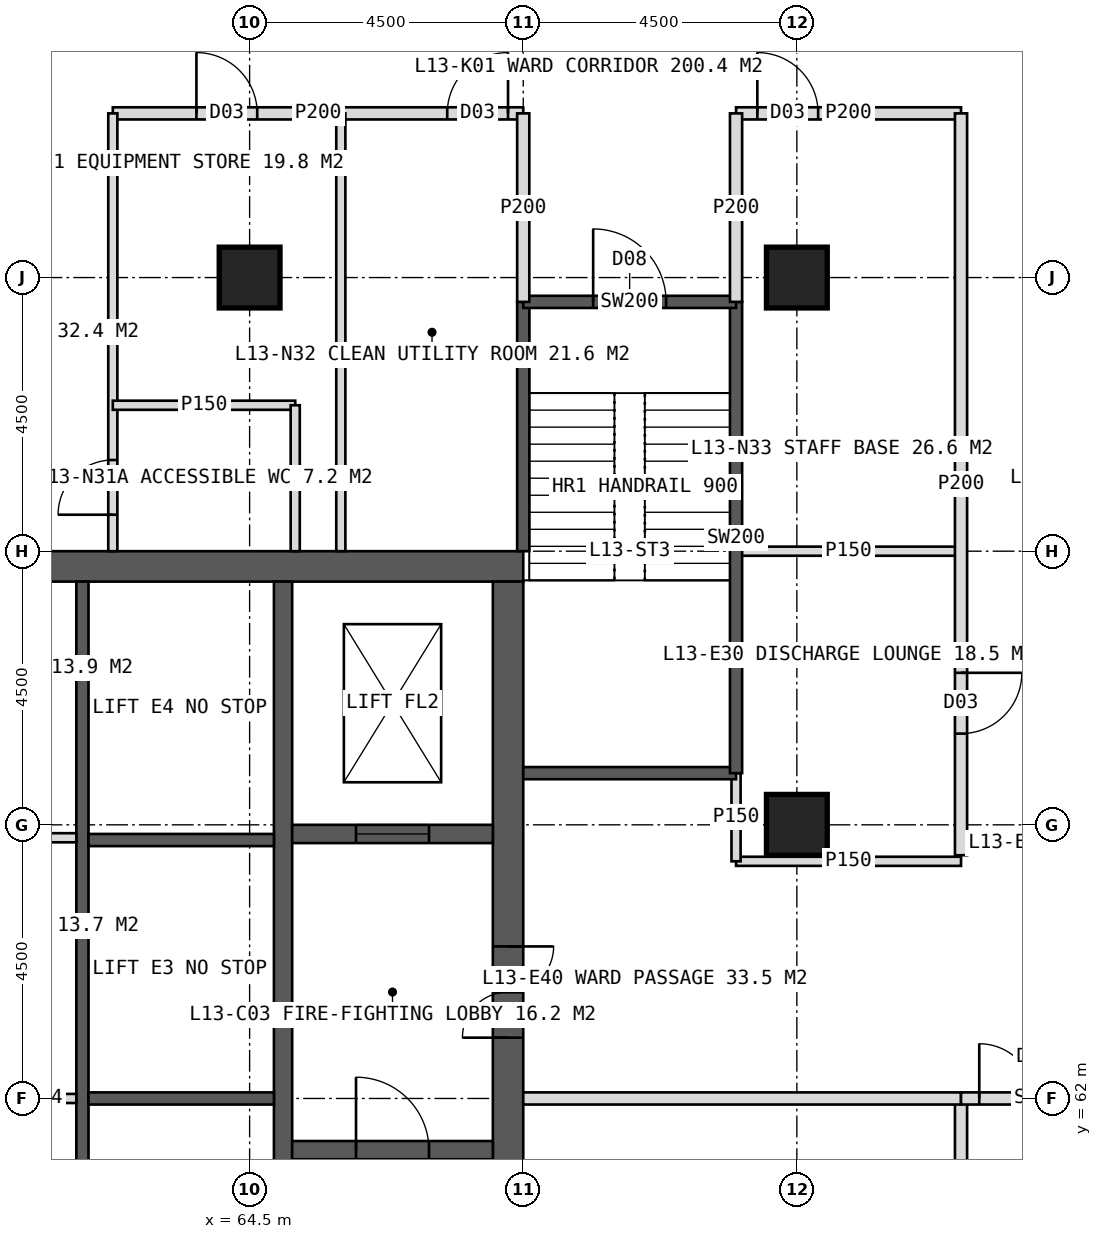
"""IFC4 building model, lengths in metres.
Left out: names, types, materials, properties, quantities, classifications, styles, units other than length and angle.
Written with IfcOpenShell. Run it as: python <this file> out.ifc"""

import sys

from ifc_helpers import new_model, si_unit, direction, frame, frame_2d, origin, origin_2d, place, context, subcontext, project, spatial, rectangle, hollow_rectangle, extrude, element, fill, save


model = new_model("IFC4")
c1 = context("Model", 3, precision=1e-05, world=origin(), true_north=direction((0.0, 1.0)))
c2 = subcontext(c1, "Body", "Model", "MODEL_VIEW")
j1 = project(units=[si_unit("LENGTHUNIT", "METRE"), si_unit("PLANEANGLEUNIT", "RADIAN")], contexts=[c1])
p1 = place(None, origin())
s1 = spatial("IfcSite", under=j1, at=p1, CompositionType="ELEMENT")
p2 = place(p1, origin())
s2 = spatial("IfcBuilding", under=s1, at=p2, CompositionType="ELEMENT")
p3 = place(p2, frame((0.0, 0.0, 59.0)))
s3 = spatial("IfcBuildingStorey", under=s2, at=p3, CompositionType="ELEMENT", Elevation=59.0)
p4 = place(p3, frame((51.0, 70.75, 0.0), z_axis=(0.0, 0.0, 1.0), x_axis=(1.0, 0.0, 0.0)))
e1 = element("IfcWall", 1, at=p4, inside=s3, PredefinedType="SHEAR", context=c2, shape_type="SweptSolid", body=[
    extrude(rectangle(XDim=18.0, YDim=0.5, at=frame_2d((9.0, 0.0))), origin(), (0.0, 0.0, 1.0), 4.0),
])
p5 = place(p4, frame((8.1, 0.0, 0.0)))
e2 = element("IfcOpeningElement", 2, at=p5, cuts=e1, PredefinedType="OPENING", context=c2, shape_type="SweptSolid", body=[
    extrude(rectangle(XDim=1.8, YDim=2.2, at=frame_2d((0.9, 1.1))), frame((0.0, 0.26, 0.0), z_axis=(0.0, -1.0, 0.0), x_axis=(1.0, 0.0, 0.0)), (0.0, 0.0, 1.0), 0.52),
])
p6 = place(p3, frame((68.75, 53.5, 0.0), z_axis=(0.0, 0.0, 1.0), x_axis=(0.0, 1.0, 0.0)))
e3 = element("IfcWall", 3, at=p6, inside=s3, PredefinedType="SHEAR", context=c2, shape_type="SweptSolid", body=[
    extrude(rectangle(XDim=17.0, YDim=0.5, at=frame_2d((8.5, 0.0))), origin(), (0.0, 0.0, 1.0), 4.0),
])
p7 = place(p6, frame((9.5, 0.0, 0.0)))
e4 = element("IfcOpeningElement", 4, at=p7, cuts=e3, PredefinedType="OPENING", context=c2, shape_type="SweptSolid", body=[
    extrude(rectangle(XDim=1.5, YDim=2.2, at=frame_2d((0.75, 1.1))), frame((0.0, 0.26, 0.0), z_axis=(0.0, -1.0, 0.0), x_axis=(1.0, 0.0, 0.0)), (0.0, 0.0, 1.0), 0.52),
])
p8 = place(p3, frame((65.05, 53.5, 0.0), z_axis=(0.0, 0.0, 1.0), x_axis=(0.0, 1.0, 0.0)))
e5 = element("IfcWall", 5, at=p8, inside=s3, PredefinedType="SHEAR", context=c2, shape_type="SweptSolid", body=[
    extrude(rectangle(XDim=17.0, YDim=0.3, at=frame_2d((8.5, 0.0))), origin(), (0.0, 0.0, 1.0), 4.0),
])
p9 = place(p3, frame((61.75, 53.5, 0.0), z_axis=(0.0, 0.0, 1.0), x_axis=(0.0, 1.0, 0.0)))
e6 = element("IfcWall", 6, at=p9, inside=s3, PredefinedType="SHEAR", context=c2, shape_type="SweptSolid", body=[
    extrude(rectangle(XDim=17.0, YDim=0.2, at=frame_2d((8.5, 0.0))), origin(), (0.0, 0.0, 1.0), 4.0),
])
p10 = place(p9, frame((1.375, 0.0, 0.0)))
e7 = element("IfcOpeningElement", 7, at=p10, cuts=e6, PredefinedType="OPENING", context=c2, shape_type="SweptSolid", body=[
    extrude(rectangle(XDim=1.4, YDim=2.2, at=frame_2d((0.7, 1.1))), frame((0.0, 0.11, 0.0), z_axis=(0.0, -1.0, 0.0), x_axis=(1.0, 0.0, 0.0)), (0.0, 0.0, 1.0), 0.22),
])
p11 = place(p9, frame((5.675, 0.0, 0.0)))
e8 = element("IfcOpeningElement", 8, at=p11, cuts=e6, PredefinedType="OPENING", context=c2, shape_type="SweptSolid", body=[
    extrude(rectangle(XDim=1.4, YDim=2.2, at=frame_2d((0.7, 1.1))), frame((0.0, 0.11, 0.0), z_axis=(0.0, -1.0, 0.0), x_axis=(1.0, 0.0, 0.0)), (0.0, 0.0, 1.0), 0.22),
])
for number, where, z_axis, x_axis in (
    (9, (61.85, 62.0, 0.0), (0.0, 0.0, 1.0), (1.0, 0.0, 0.0)),
    (10, (61.85, 66.25, 0.0), (0.0, 0.0, 1.0), (1.0, 0.0, 0.0)),
):
    element("IfcWall", number, at=place(p3, frame(where, z_axis=z_axis, x_axis=x_axis)), inside=s3, PredefinedType="SHEAR", context=c2, shape_type="SweptSolid", body=[
        extrude(rectangle(XDim=3.05, YDim=0.2, at=frame_2d((1.525, 0.0))), origin(), (0.0, 0.0, 1.0), 4.0),
    ])
p12 = place(p3, frame((65.2, 61.15, 0.0), z_axis=(0.0, 0.0, 1.0), x_axis=(1.0, 0.0, 0.0)))
e11 = element("IfcWall", 11, at=p12, inside=s3, PredefinedType="SHEAR", context=c2, shape_type="SweptSolid", body=[
    extrude(rectangle(XDim=3.3, YDim=0.3, at=frame_2d((1.65, 0.0))), origin(), (0.0, 0.0, 1.0), 4.0),
])
p13 = place(p12, frame((1.05, 0.0, 0.0)))
e12 = element("IfcOpeningElement", 12, at=p13, cuts=e11, PredefinedType="OPENING", context=c2, shape_type="SweptSolid", body=[
    extrude(rectangle(XDim=1.2, YDim=2.1, at=frame_2d((0.6, 1.05))), frame((0.0, 0.16, 0.0), z_axis=(0.0, -1.0, 0.0), x_axis=(1.0, 0.0, 0.0)), (0.0, 0.0, 1.0), 0.32),
])
p14 = place(p3, frame((65.2, 66.35, 0.0), z_axis=(0.0, 0.0, 1.0), x_axis=(1.0, 0.0, 0.0)))
e13 = element("IfcWall", 13, at=p14, inside=s3, PredefinedType="SHEAR", context=c2, shape_type="SweptSolid", body=[
    extrude(rectangle(XDim=3.3, YDim=0.3, at=frame_2d((1.65, 0.0))), origin(), (0.0, 0.0, 1.0), 4.0),
])
p15 = place(p14, frame((1.05, 0.0, 0.0)))
e14 = element("IfcOpeningElement", 14, at=p15, cuts=e13, PredefinedType="OPENING", context=c2, shape_type="SweptSolid", body=[
    extrude(rectangle(XDim=1.2, YDim=2.2, at=frame_2d((0.6, 1.1))), frame((0.0, 0.16, 0.0), z_axis=(0.0, -1.0, 0.0), x_axis=(1.0, 0.0, 0.0)), (0.0, 0.0, 1.0), 0.32),
])
for number, where, z_axis, x_axis in (
    (15, (73.5, 75.5, 0.0), (0.0, 0.0, 1.0), (1.0, 0.0, 0.0)),
    (16, (64.5, 75.5, 0.0), (0.0, 0.0, 1.0), (1.0, 0.0, 0.0)),
    (17, (73.5, 66.5, 0.0), (0.0, 0.0, 1.0), (1.0, 0.0, 0.0)),
):
    element("IfcColumn", number, at=place(p3, frame(where, z_axis=z_axis, x_axis=x_axis)), inside=s3, PredefinedType="COLUMN", context=c2, shape_type="SweptSolid", body=[
        extrude(hollow_rectangle(XDim=1.0, YDim=1.0, WallThickness=0.1, at=origin_2d()), origin(), (0.0, 0.0, 1.0), 4.0),
    ])
p16 = place(p3, frame((62.25, 78.2, 0.0), z_axis=(0.0, 0.0, 1.0), x_axis=(1.0, 0.0, 0.0)))
e18 = element("IfcWall", 18, at=p16, inside=s3, PredefinedType="PARTITIONING", context=c2, shape_type="SweptSolid", body=[
    extrude(rectangle(XDim=6.75, YDim=0.2, at=frame_2d((3.375, 0.0))), origin(), (0.0, 0.0, 1.0), 3.75),
])
p17 = place(p16, frame((1.375, 0.0, 0.0)))
e19 = element("IfcOpeningElement", 19, at=p17, cuts=e18, PredefinedType="OPENING", context=c2, shape_type="SweptSolid", body=[
    extrude(rectangle(XDim=1.0, YDim=2.1, at=frame_2d((0.5, 1.05))), frame((0.0, 0.11, 0.0), z_axis=(0.0, -1.0, 0.0), x_axis=(1.0, 0.0, 0.0)), (0.0, 0.0, 1.0), 0.22),
])
p18 = place(p16, frame((5.5, 0.0, 0.0)))
e20 = element("IfcOpeningElement", 20, at=p18, cuts=e18, PredefinedType="OPENING", context=c2, shape_type="SweptSolid", body=[
    extrude(rectangle(XDim=1.0, YDim=2.1, at=frame_2d((0.5, 1.05))), frame((0.0, 0.11, 0.0), z_axis=(0.0, -1.0, 0.0), x_axis=(1.0, 0.0, 0.0)), (0.0, 0.0, 1.0), 0.22),
])
p19 = place(p3, frame((72.5, 78.2, 0.0), z_axis=(0.0, 0.0, 1.0), x_axis=(1.0, 0.0, 0.0)))
e21 = element("IfcWall", 21, at=p19, inside=s3, PredefinedType="PARTITIONING", context=c2, shape_type="SweptSolid", body=[
    extrude(rectangle(XDim=3.7, YDim=0.2, at=frame_2d((1.85, 0.0))), origin(), (0.0, 0.0, 1.0), 3.75),
])
p20 = place(p19, frame((0.35, 0.0, 0.0)))
e22 = element("IfcOpeningElement", 22, at=p20, cuts=e21, PredefinedType="OPENING", context=c2, shape_type="SweptSolid", body=[
    extrude(rectangle(XDim=1.0, YDim=2.1, at=frame_2d((0.5, 1.05))), frame((0.0, 0.11, 0.0), z_axis=(0.0, -1.0, 0.0), x_axis=(1.0, 0.0, 0.0)), (0.0, 0.0, 1.0), 0.22),
])
p21 = place(p3, frame((62.25, 71.0, 0.0), z_axis=(0.0, 0.0, 1.0), x_axis=(0.0, 1.0, 0.0)))
e23 = element("IfcWall", 23, at=p21, inside=s3, PredefinedType="PARTITIONING", context=c2, shape_type="SweptSolid", body=[
    extrude(rectangle(XDim=7.2, YDim=0.15, at=frame_2d((3.6, 0.0))), origin(), (0.0, 0.0, 1.0), 3.75),
])
p22 = place(p21, frame((0.6, 0.0, 0.0)))
e24 = element("IfcOpeningElement", 24, at=p22, cuts=e23, PredefinedType="OPENING", context=c2, shape_type="SweptSolid", body=[
    extrude(rectangle(XDim=0.9, YDim=2.1, at=frame_2d((0.45, 1.05))), frame((0.0, 0.085, 0.0), z_axis=(0.0, -1.0, 0.0), x_axis=(1.0, 0.0, 0.0)), (0.0, 0.0, 1.0), 0.17),
])
p23 = place(p3, frame((66.0, 71.0, 0.0), z_axis=(0.0, 0.0, 1.0), x_axis=(0.0, 1.0, 0.0)))
e25 = element("IfcWall", 25, at=p23, inside=s3, PredefinedType="PARTITIONING", context=c2, shape_type="SweptSolid", body=[
    extrude(rectangle(XDim=7.2, YDim=0.15, at=frame_2d((3.6, 0.0))), origin(), (0.0, 0.0, 1.0), 3.75),
])
p24 = place(p3, frame((62.25, 73.4, 0.0), z_axis=(0.0, 0.0, 1.0), x_axis=(1.0, 0.0, 0.0)))
e26 = element("IfcWall", 26, at=p24, inside=s3, PredefinedType="PARTITIONING", context=c2, shape_type="SweptSolid", body=[
    extrude(rectangle(XDim=3.0, YDim=0.15, at=frame_2d((1.5, 0.0))), origin(), (0.0, 0.0, 1.0), 3.75),
])
p25 = place(p3, frame((65.25, 71.0, 0.0), z_axis=(0.0, 0.0, 1.0), x_axis=(0.0, 1.0, 0.0)))
e27 = element("IfcWall", 27, at=p25, inside=s3, PredefinedType="PARTITIONING", context=c2, shape_type="SweptSolid", body=[
    extrude(rectangle(XDim=2.4, YDim=0.15, at=frame_2d((1.2, 0.0))), origin(), (0.0, 0.0, 1.0), 3.75),
])
p26 = place(p3, frame((72.5, 71.0, 0.0), z_axis=(0.0, 0.0, 1.0), x_axis=(1.0, 0.0, 0.0)))
e28 = element("IfcWall", 28, at=p26, inside=s3, PredefinedType="PARTITIONING", context=c2, shape_type="SweptSolid", body=[
    extrude(rectangle(XDim=3.7, YDim=0.15, at=frame_2d((1.85, 0.0))), origin(), (0.0, 0.0, 1.0), 3.75),
])
p27 = place(p3, frame((76.2, 78.2, 0.0), z_axis=(0.0, 0.0, 1.0), x_axis=(0.0, -1.0, 0.0)))
e29 = element("IfcWall", 29, at=p27, inside=s3, PredefinedType="PARTITIONING", context=c2, shape_type="SweptSolid", body=[
    extrude(rectangle(XDim=12.2, YDim=0.2, at=frame_2d((6.1, 0.0))), origin(), (0.0, 0.0, 1.0), 3.75),
])
p28 = place(p27, frame((9.2, 0.0, 0.0)))
e30 = element("IfcOpeningElement", 30, at=p28, cuts=e29, PredefinedType="OPENING", context=c2, shape_type="SweptSolid", body=[
    extrude(rectangle(XDim=1.0, YDim=2.1, at=frame_2d((0.5, 1.05))), frame((0.0, 0.11, 0.0), z_axis=(0.0, -1.0, 0.0), x_axis=(1.0, 0.0, 0.0)), (0.0, 0.0, 1.0), 0.22),
])
p29 = place(p3, frame((76.2, 62.0, 0.0), z_axis=(0.0, 0.0, 1.0), x_axis=(0.0, -1.0, 0.0)))
e31 = element("IfcWall", 31, at=p29, inside=s3, PredefinedType="PARTITIONING", context=c2, shape_type="SweptSolid", body=[
    extrude(rectangle(XDim=16.2, YDim=0.2, at=frame_2d((8.1, 0.0))), origin(), (0.0, 0.0, 1.0), 3.75),
])
p30 = place(p29, frame((4.0, 0.0, 0.0)))
e32 = element("IfcOpeningElement", 32, at=p30, cuts=e31, PredefinedType="OPENING", context=c2, shape_type="SweptSolid", body=[
    extrude(rectangle(XDim=1.0, YDim=2.1, at=frame_2d((0.5, 1.05))), frame((0.0, 0.11, 0.0), z_axis=(0.0, -1.0, 0.0), x_axis=(1.0, 0.0, 0.0)), (0.0, 0.0, 1.0), 0.22),
])
p31 = place(p29, frame((12.1, 0.0, 0.0)))
e33 = element("IfcOpeningElement", 33, at=p31, cuts=e31, PredefinedType="OPENING", context=c2, shape_type="SweptSolid", body=[
    extrude(rectangle(XDim=1.0, YDim=2.1, at=frame_2d((0.5, 1.05))), frame((0.0, 0.11, 0.0), z_axis=(0.0, -1.0, 0.0), x_axis=(1.0, 0.0, 0.0)), (0.0, 0.0, 1.0), 0.22),
])
p32 = place(p3, frame((72.5, 65.9, 0.0), z_axis=(0.0, 0.0, 1.0), x_axis=(1.0, 0.0, 0.0)))
e34 = element("IfcWall", 34, at=p32, inside=s3, PredefinedType="PARTITIONING", context=c2, shape_type="SweptSolid", body=[
    extrude(rectangle(XDim=3.7, YDim=0.15, at=frame_2d((1.85, 0.0))), origin(), (0.0, 0.0, 1.0), 3.75),
])
p33 = place(p3, frame((69.0, 62.0, 0.0), z_axis=(0.0, 0.0, 1.0), x_axis=(1.0, 0.0, 0.0)))
e35 = element("IfcWall", 35, at=p33, inside=s3, PredefinedType="SOLIDWALL", context=c2, shape_type="SweptSolid", body=[
    extrude(rectangle(XDim=7.2, YDim=0.2, at=frame_2d((3.6, 0.0))), origin(), (0.0, 0.0, 1.0), 2.75),
])
p34 = place(p3, frame((76.2, 62.0, 0.0), z_axis=(0.0, 0.0, 1.0), x_axis=(1.0, 0.0, 0.0)))
e36 = element("IfcWall", 36, at=p34, inside=s3, PredefinedType="SOLIDWALL", context=c2, shape_type="SweptSolid", body=[
    extrude(rectangle(XDim=2.7, YDim=0.2, at=frame_2d((1.35, 0.0))), origin(), (0.0, 0.0, 1.0), 2.75),
])
p35 = place(p34, frame((0.3, 0.0, 0.0)))
e37 = element("IfcOpeningElement", 37, at=p35, cuts=e36, PredefinedType="OPENING", context=c2, shape_type="SweptSolid", body=[
    extrude(rectangle(XDim=1.8, YDim=2.2, at=frame_2d((0.9, 1.1))), frame((0.0, 0.11, 0.0), z_axis=(0.0, -1.0, 0.0), x_axis=(1.0, 0.0, 0.0)), (0.0, 0.0, 1.0), 0.22),
])
p36 = place(p3, frame((58.35, 62.0, 0.0), z_axis=(0.0, 0.0, 1.0), x_axis=(1.0, 0.0, 0.0)))
e38 = element("IfcWall", 38, at=p36, inside=s3, PredefinedType="PARTITIONING", context=c2, shape_type="SweptSolid", body=[
    extrude(rectangle(XDim=3.3, YDim=0.15, at=frame_2d((1.65, 0.0))), origin(), (0.0, 0.0, 1.0), 3.75),
])
p37 = place(p36, frame((1.15, 0.0, 0.0)))
e39 = element("IfcOpeningElement", 39, at=p37, cuts=e38, PredefinedType="OPENING", context=c2, shape_type="SweptSolid", body=[
    extrude(rectangle(XDim=1.0, YDim=2.1, at=frame_2d((0.5, 1.05))), frame((0.0, 0.085, 0.0), z_axis=(0.0, -1.0, 0.0), x_axis=(1.0, 0.0, 0.0)), (0.0, 0.0, 1.0), 0.17),
])
p38 = place(p3, frame((58.35, 66.288, 0.0), z_axis=(0.0, 0.0, 1.0), x_axis=(1.0, 0.0, 0.0)))
e40 = element("IfcWall", 40, at=p38, inside=s3, PredefinedType="PARTITIONING", context=c2, shape_type="SweptSolid", body=[
    extrude(rectangle(XDim=3.3, YDim=0.15, at=frame_2d((1.65, 0.0))), origin(), (0.0, 0.0, 1.0), 3.75),
])
p39 = place(p3, frame((72.5, 65.9, 0.0), z_axis=(0.0, 0.0, 1.0), x_axis=(0.0, 1.0, 0.0)))
e41 = element("IfcWall", 41, at=p39, inside=s3, PredefinedType="PARTITIONING", context=c2, shape_type="SweptSolid", body=[
    extrude(rectangle(XDim=1.45, YDim=0.15, at=frame_2d((0.725, 0.0))), origin(), (0.0, 0.0, 1.0), 3.75),
])
p40 = place(p3, frame((69.0, 71.0, 0.0), z_axis=(0.0, 0.0, 1.0), x_axis=(0.0, 1.0, 0.0)))
e42 = element("IfcWall", 42, at=p40, inside=s3, PredefinedType="SOLIDWALL", context=c2, shape_type="SweptSolid", body=[
    extrude(rectangle(XDim=4.1, YDim=0.2, at=frame_2d((2.05, 0.0))), origin(), (0.0, 0.0, 1.0), 3.75),
])
p41 = place(p3, frame((69.0, 67.35, 0.0), z_axis=(0.0, 0.0, 1.0), x_axis=(1.0, 0.0, 0.0)))
e43 = element("IfcWall", 43, at=p41, inside=s3, PredefinedType="SOLIDWALL", context=c2, shape_type="SweptSolid", body=[
    extrude(rectangle(XDim=3.5, YDim=0.2, at=frame_2d((1.75, 0.0))), origin(), (0.0, 0.0, 1.0), 3.75),
])
p42 = place(p3, frame((72.5, 67.35, 0.0), z_axis=(0.0, 0.0, 1.0), x_axis=(0.0, 1.0, 0.0)))
e44 = element("IfcWall", 44, at=p42, inside=s3, PredefinedType="SOLIDWALL", context=c2, shape_type="SweptSolid", body=[
    extrude(rectangle(XDim=7.75, YDim=0.2, at=frame_2d((3.875, 0.0))), origin(), (0.0, 0.0, 1.0), 3.75),
])
p43 = place(p3, frame((69.0, 75.1, 0.0), z_axis=(0.0, 0.0, 1.0), x_axis=(1.0, 0.0, 0.0)))
e45 = element("IfcWall", 45, at=p43, inside=s3, PredefinedType="SOLIDWALL", context=c2, shape_type="SweptSolid", body=[
    extrude(rectangle(XDim=3.5, YDim=0.2, at=frame_2d((1.75, 0.0))), origin(), (0.0, 0.0, 1.0), 3.75),
])
p44 = place(p43, frame((1.15, 0.0, 0.0)))
e46 = element("IfcOpeningElement", 46, at=p44, cuts=e45, PredefinedType="OPENING", context=c2, shape_type="SweptSolid", body=[
    extrude(rectangle(XDim=1.2, YDim=2.1, at=frame_2d((0.6, 1.05))), frame((0.0, 0.11, 0.0), z_axis=(0.0, -1.0, 0.0), x_axis=(1.0, 0.0, 0.0)), (0.0, 0.0, 1.0), 0.22),
])
for number, where, z_axis, x_axis in (
    (47, (69.0, 75.1, 0.0), (0.0, 0.0, 1.0), (0.0, 1.0, 0.0)),
    (48, (72.5, 75.1, 0.0), (0.0, 0.0, 1.0), (0.0, 1.0, 0.0)),
):
    element("IfcWall", number, at=place(p3, frame(where, z_axis=z_axis, x_axis=x_axis)), inside=s3, PredefinedType="PARTITIONING", context=c2, shape_type="SweptSolid", body=[
        extrude(rectangle(XDim=3.1, YDim=0.2, at=frame_2d((1.55, 0.0))), origin(), (0.0, 0.0, 1.0), 3.75),
    ])
p45 = place(p22, origin())
e49 = element("IfcDoor", 49, at=p45, inside=s3, OperationType="SINGLE_SWING_LEFT", PredefinedType="DOOR", context=c2, shape_type="SweptSolid", body=[
    extrude(rectangle(XDim=0.9, YDim=2.1, at=frame_2d((0.45, 1.05))), frame((0.0, 0.025, 0.0), z_axis=(0.0, -1.0, 0.0), x_axis=(1.0, 0.0, 0.0)), (0.0, 0.0, 1.0), 0.05),
])
fill(e24, e49)
p46 = place(p17, origin())
e50 = element("IfcDoor", 50, at=p46, inside=s3, OperationType="SINGLE_SWING_LEFT", PredefinedType="DOOR", context=c2, shape_type="SweptSolid", body=[
    extrude(rectangle(XDim=1.0, YDim=2.1, at=frame_2d((0.5, 1.05))), frame((0.0, 0.025, 0.0), z_axis=(0.0, -1.0, 0.0), x_axis=(1.0, 0.0, 0.0)), (0.0, 0.0, 1.0), 0.05),
])
fill(e19, e50)
p47 = place(p18, origin())
e51 = element("IfcDoor", 51, at=p47, inside=s3, OperationType="SINGLE_SWING_RIGHT", PredefinedType="DOOR", context=c2, shape_type="SweptSolid", body=[
    extrude(rectangle(XDim=1.0, YDim=2.1, at=frame_2d((0.5, 1.05))), frame((0.0, 0.025, 0.0), z_axis=(0.0, -1.0, 0.0), x_axis=(1.0, 0.0, 0.0)), (0.0, 0.0, 1.0), 0.05),
])
fill(e20, e51)
p48 = place(p20, origin())
e52 = element("IfcDoor", 52, at=p48, inside=s3, OperationType="SINGLE_SWING_LEFT", PredefinedType="DOOR", context=c2, shape_type="SweptSolid", body=[
    extrude(rectangle(XDim=1.0, YDim=2.1, at=frame_2d((0.5, 1.05))), frame((0.0, 0.025, 0.0), z_axis=(0.0, -1.0, 0.0), x_axis=(1.0, 0.0, 0.0)), (0.0, 0.0, 1.0), 0.05),
])
fill(e22, e52)
p49 = place(p28, origin())
e53 = element("IfcDoor", 53, at=p49, inside=s3, OperationType="SINGLE_SWING_LEFT", PredefinedType="DOOR", context=c2, shape_type="SweptSolid", body=[
    extrude(rectangle(XDim=1.0, YDim=2.1, at=frame_2d((0.5, 1.05))), frame((0.0, 0.025, 0.0), z_axis=(0.0, -1.0, 0.0), x_axis=(1.0, 0.0, 0.0)), (0.0, 0.0, 1.0), 0.05),
])
fill(e30, e53)
p50 = place(p35, origin())
e54 = element("IfcDoor", 54, at=p50, inside=s3, OperationType="DOUBLE_DOOR_DOUBLE_SWING", PredefinedType="DOOR", context=c2, shape_type="SweptSolid", body=[
    extrude(rectangle(XDim=1.8, YDim=2.2, at=frame_2d((0.9, 1.1))), frame((0.0, 0.025, 0.0), z_axis=(0.0, -1.0, 0.0), x_axis=(1.0, 0.0, 0.0)), (0.0, 0.0, 1.0), 0.05),
])
fill(e37, e54)
p51 = place(p7, origin())
e55 = element("IfcDoor", 55, at=p51, inside=s3, OperationType="DOUBLE_DOOR_SINGLE_SWING", PredefinedType="DOOR", context=c2, shape_type="SweptSolid", body=[
    extrude(rectangle(XDim=1.5, YDim=2.2, at=frame_2d((0.75, 1.1))), frame((0.0, 0.025, 0.0), z_axis=(0.0, -1.0, 0.0), x_axis=(1.0, 0.0, 0.0)), (0.0, 0.0, 1.0), 0.05),
])
fill(e4, e55)
p52 = place(p13, origin())
e56 = element("IfcDoor", 56, at=p52, inside=s3, OperationType="SINGLE_SWING_LEFT", PredefinedType="DOOR", context=c2, shape_type="SweptSolid", body=[
    extrude(rectangle(XDim=1.2, YDim=2.1, at=frame_2d((0.6, 1.05))), frame((0.0, 0.025, 0.0), z_axis=(0.0, -1.0, 0.0), x_axis=(1.0, 0.0, 0.0)), (0.0, 0.0, 1.0), 0.05),
])
fill(e12, e56)
p53 = place(p15, origin())
e57 = element("IfcDoor", 57, at=p53, inside=s3, OperationType="SLIDING_TO_LEFT", PredefinedType="DOOR", context=c2, shape_type="SweptSolid", body=[
    extrude(rectangle(XDim=1.2, YDim=2.2, at=frame_2d((0.6, 1.1))), frame((0.0, 0.025, 0.0), z_axis=(0.0, -1.0, 0.0), x_axis=(1.0, 0.0, 0.0)), (0.0, 0.0, 1.0), 0.05),
])
fill(e14, e57)
p54 = place(p44, origin())
e58 = element("IfcDoor", 58, at=p54, inside=s3, OperationType="SINGLE_SWING_LEFT", PredefinedType="DOOR", context=c2, shape_type="SweptSolid", body=[
    extrude(rectangle(XDim=1.2, YDim=2.1, at=frame_2d((0.6, 1.05))), frame((0.0, 0.025, 0.0), z_axis=(0.0, -1.0, 0.0), x_axis=(1.0, 0.0, 0.0)), (0.0, 0.0, 1.0), 0.05),
])
fill(e46, e58)
save(model, sys.argv[1])
